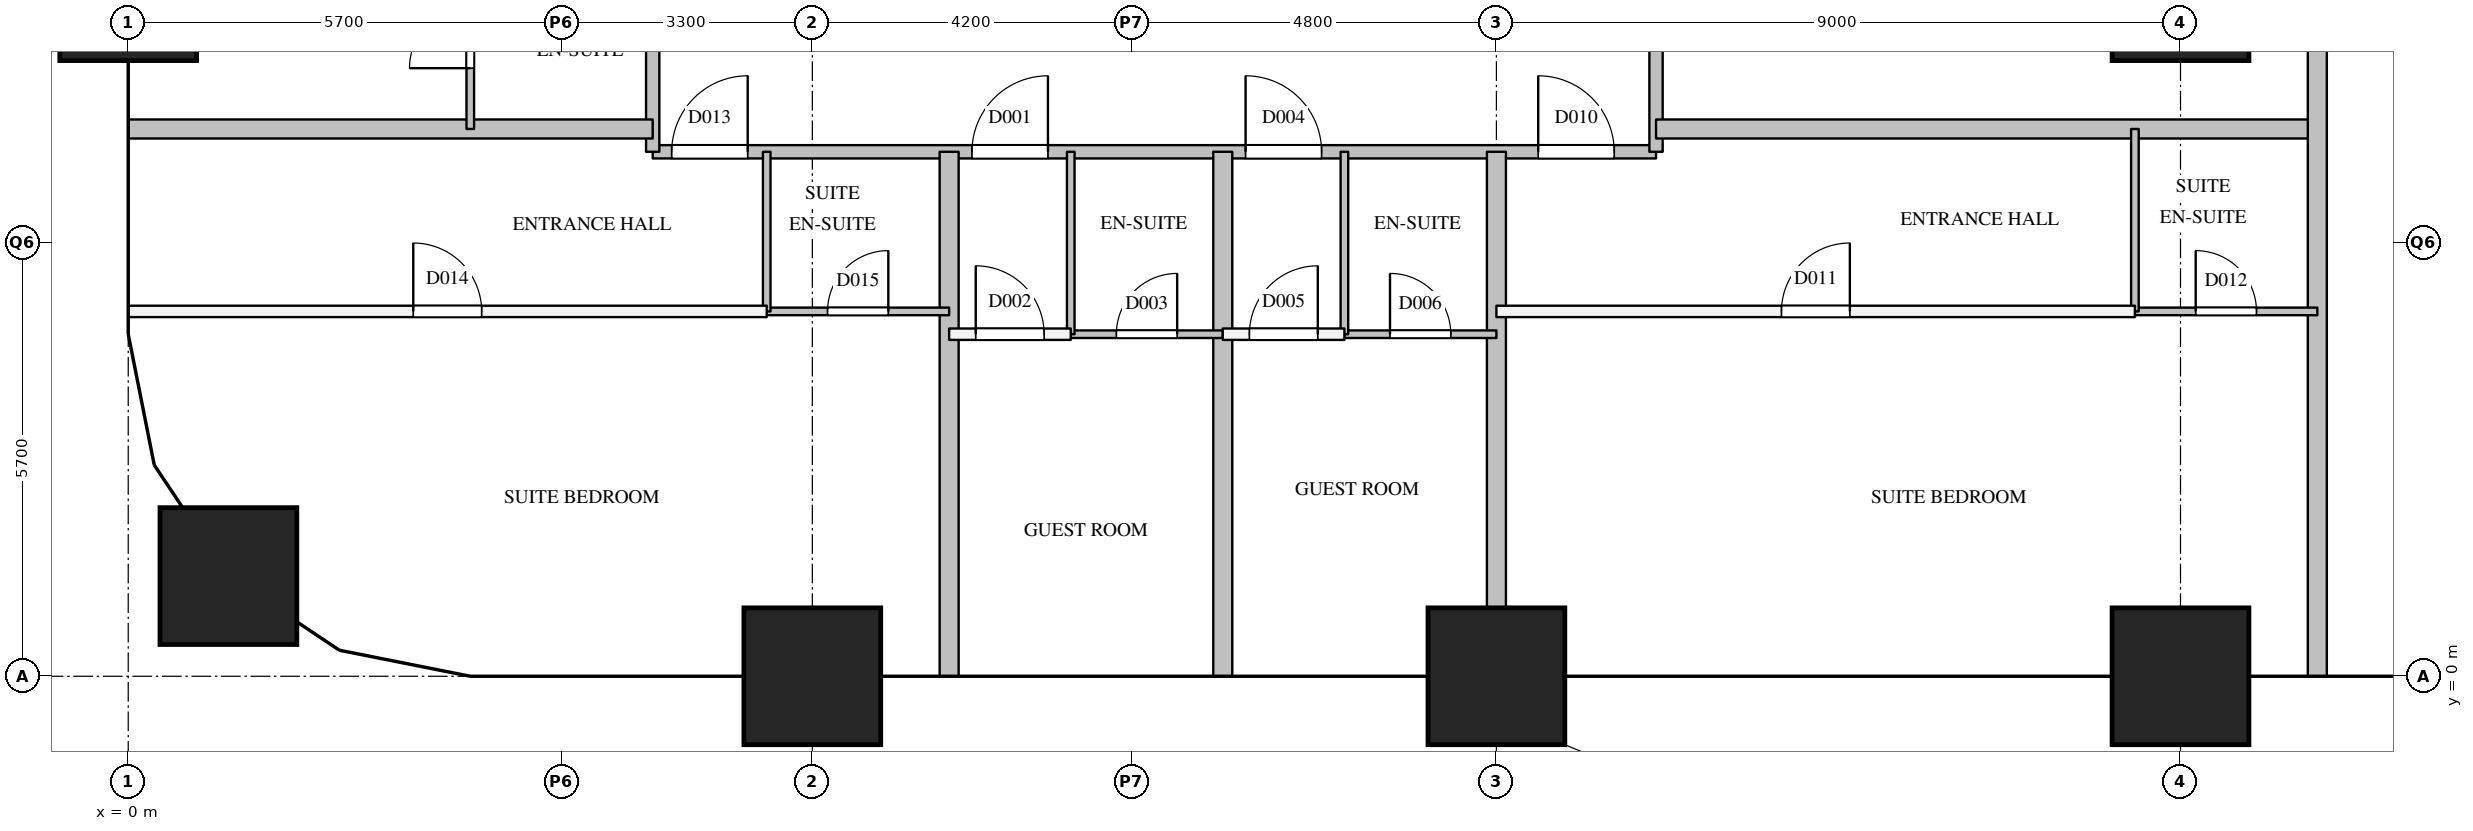
"""IFC4 building model, lengths in metres.
Left out: names, types, materials, properties, quantities, classifications, styles, units other than length and angle.
Written with IfcOpenShell. Run it as: python <this file> out.ifc"""

import sys

from ifc_helpers import new_model, si_unit, direction, frame, frame_2d, origin, origin_2d, place, context, subcontext, project, spatial, rectangle, extrude, element, fill, save


model = new_model("IFC4")
c1 = context("Model", 3, precision=1e-05, world=origin(), true_north=direction((0.0, 1.0)))
c2 = subcontext(c1, "Body", "Model", "MODEL_VIEW")
j1 = project(units=[si_unit("LENGTHUNIT", "METRE"), si_unit("PLANEANGLEUNIT", "RADIAN")], contexts=[c1])
p1 = place(None, origin())
s1 = spatial("IfcSite", under=j1, at=p1, CompositionType="ELEMENT")
p2 = place(p1, origin())
s2 = spatial("IfcBuilding", under=s1, at=p2, CompositionType="ELEMENT")
p3 = place(p2, frame((0.0, 0.0, 69.0)))
s3 = spatial("IfcBuildingStorey", under=s2, at=p3, CompositionType="ELEMENT", Elevation=69.0)
for number, where, z_axis, x_axis in (
    (1, (1.318, 1.318, 0.0), (0.0, 0.0, 1.0), (1.0, 0.0, 0.0)),
    (2, (0.0, 9.0, 0.0), (0.0, 0.0, 1.0), (1.0, 0.0, 0.0)),
    (3, (9.0, 0.0, 0.0), (0.0, 0.0, 1.0), (1.0, 0.0, 0.0)),
    (4, (18.0, 0.0, 0.0), (0.0, 0.0, 1.0), (1.0, 0.0, 0.0)),
    (5, (27.0, 0.0, 0.0), (0.0, 0.0, 1.0), (1.0, 0.0, 0.0)),
    (6, (27.0, 9.0, 0.0), (0.0, 0.0, 1.0), (1.0, 0.0, 0.0)),
):
    element("IfcColumn", number, at=place(p3, frame(where, z_axis=z_axis, x_axis=x_axis)), inside=s3, PredefinedType="COLUMN", context=c2, shape_type="SweptSolid", body=[
        extrude(rectangle(XDim=1.8, YDim=1.8, at=origin_2d()), origin(), (0.0, 0.0, 1.0), 3.8),
    ])
p4 = place(p3, frame((6.9, 6.9, 0.0), z_axis=(0.0, 0.0, 1.0), x_axis=(1.0, 0.0, 0.0)))
e7 = element("IfcWall", 7, at=p4, inside=s3, PredefinedType="PARTITIONING", context=c2, shape_type="SweptSolid", body=[
    extrude(rectangle(XDim=13.2, YDim=0.175, at=frame_2d((6.6, 0.0))), origin(), (0.0, 0.0, 1.0), 3.5),
])
p5 = place(p4, frame((4.2, 0.0, 0.0)))
e8 = element("IfcOpeningElement", 8, at=p5, cuts=e7, PredefinedType="OPENING", context=c2, shape_type="SweptSolid", body=[
    extrude(rectangle(XDim=1.0, YDim=2.1, at=frame_2d((0.5, 1.05))), frame((0.0, 0.097, 0.0), z_axis=(0.0, -1.0, 0.0), x_axis=(1.0, 0.0, 0.0)), (0.0, 0.0, 1.0), 0.195),
])
p6 = place(p4, frame((7.8, 0.0, 0.0)))
e9 = element("IfcOpeningElement", 9, at=p6, cuts=e7, PredefinedType="OPENING", context=c2, shape_type="SweptSolid", body=[
    extrude(rectangle(XDim=1.0, YDim=2.1, at=frame_2d((0.5, 1.05))), frame((0.0, 0.097, 0.0), z_axis=(0.0, -1.0, 0.0), x_axis=(1.0, 0.0, 0.0)), (0.0, 0.0, 1.0), 0.195),
])
p7 = place(p4, frame((11.65, 0.0, 0.0)))
e10 = element("IfcOpeningElement", 10, at=p7, cuts=e7, PredefinedType="OPENING", context=c2, shape_type="SweptSolid", body=[
    extrude(rectangle(XDim=1.0, YDim=2.1, at=frame_2d((0.5, 1.05))), frame((0.0, 0.097, 0.0), z_axis=(0.0, -1.0, 0.0), x_axis=(1.0, 0.0, 0.0)), (0.0, 0.0, 1.0), 0.195),
])
p8 = place(p4, frame((0.25, 0.0, 0.0)))
e11 = element("IfcOpeningElement", 11, at=p8, cuts=e7, PredefinedType="OPENING", context=c2, shape_type="SweptSolid", body=[
    extrude(rectangle(XDim=1.0, YDim=2.1, at=frame_2d((0.5, 1.05))), frame((0.0, 0.097, 0.0), z_axis=(0.0, -1.0, 0.0), x_axis=(1.0, 0.0, 0.0)), (0.0, 0.0, 1.0), 0.195),
])
p9 = place(p3, frame((6.9, 6.9, 0.0), z_axis=(0.0, 0.0, 1.0), x_axis=(0.0, 1.0, 0.0)))
e12 = element("IfcWall", 12, at=p9, inside=s3, PredefinedType="PARTITIONING", context=c2, shape_type="SweptSolid", body=[
    extrude(rectangle(XDim=17.09, YDim=0.175, at=frame_2d((8.545, 0.0))), origin(), (0.0, 0.0, 1.0), 3.5),
])
p10 = place(p9, frame((6.4, 0.0, 0.0)))
e13 = element("IfcOpeningElement", 13, at=p10, cuts=e12, PredefinedType="OPENING", context=c2, shape_type="SweptSolid", body=[
    extrude(rectangle(XDim=1.0, YDim=2.1, at=frame_2d((0.5, 1.05))), frame((0.0, 0.097, 0.0), z_axis=(0.0, -1.0, 0.0), x_axis=(1.0, 0.0, 0.0)), (0.0, 0.0, 1.0), 0.195),
])
p11 = place(p9, frame((14.795, 0.0, 0.0)))
e14 = element("IfcOpeningElement", 14, at=p11, cuts=e12, PredefinedType="OPENING", context=c2, shape_type="SweptSolid", body=[
    extrude(rectangle(XDim=1.0, YDim=2.1, at=frame_2d((0.5, 1.05))), frame((0.0, 0.097, 0.0), z_axis=(0.0, -1.0, 0.0), x_axis=(1.0, 0.0, 0.0)), (0.0, 0.0, 1.0), 0.195),
])
p12 = place(p3, frame((20.1, 6.9, 0.0), z_axis=(0.0, 0.0, 1.0), x_axis=(0.0, 1.0, 0.0)))
e15 = element("IfcWall", 15, at=p12, inside=s3, PredefinedType="PARTITIONING", context=c2, shape_type="SweptSolid", body=[
    extrude(rectangle(XDim=17.69, YDim=0.175, at=frame_2d((8.845, 0.0))), origin(), (0.0, 0.0, 1.0), 3.5),
])
p13 = place(p12, frame((1.6, 0.0, 0.0)))
e16 = element("IfcOpeningElement", 16, at=p13, cuts=e15, PredefinedType="OPENING", context=c2, shape_type="SweptSolid", body=[
    extrude(rectangle(XDim=1.0, YDim=2.1, at=frame_2d((0.5, 1.05))), frame((0.0, 0.097, 0.0), z_axis=(0.0, -1.0, 0.0), x_axis=(1.0, 0.0, 0.0)), (0.0, 0.0, 1.0), 0.195),
])
p14 = place(p12, frame((5.2, 0.0, 0.0)))
e17 = element("IfcOpeningElement", 17, at=p14, cuts=e15, PredefinedType="OPENING", context=c2, shape_type="SweptSolid", body=[
    extrude(rectangle(XDim=1.0, YDim=2.1, at=frame_2d((0.5, 1.05))), frame((0.0, 0.097, 0.0), z_axis=(0.0, -1.0, 0.0), x_axis=(1.0, 0.0, 0.0)), (0.0, 0.0, 1.0), 0.195),
])
p15 = place(p12, frame((13.895, 0.0, 0.0)))
e18 = element("IfcOpeningElement", 18, at=p15, cuts=e15, PredefinedType="OPENING", context=c2, shape_type="SweptSolid", body=[
    extrude(rectangle(XDim=1.0, YDim=2.1, at=frame_2d((0.5, 1.05))), frame((0.0, 0.097, 0.0), z_axis=(0.0, -1.0, 0.0), x_axis=(1.0, 0.0, 0.0)), (0.0, 0.0, 1.0), 0.195),
])
p16 = place(p3, frame((10.8, 4.5, 0.0), z_axis=(0.0, 0.0, 1.0), x_axis=(1.0, 0.0, 0.0)))
e19 = element("IfcWall", 19, at=p16, inside=s3, PredefinedType="PARTITIONING", context=c2, shape_type="SweptSolid", body=[
    extrude(rectangle(XDim=1.6, YDim=0.15, at=frame_2d((0.8, 0.0))), origin(), (0.0, 0.0, 1.0), 3.5),
])
p17 = place(p16, frame((0.35, 0.0, 0.0)))
e20 = element("IfcOpeningElement", 20, at=p17, cuts=e19, PredefinedType="OPENING", context=c2, shape_type="SweptSolid", body=[
    extrude(rectangle(XDim=0.9, YDim=2.1, at=frame_2d((0.45, 1.05))), frame((0.0, 0.085, 0.0), z_axis=(0.0, -1.0, 0.0), x_axis=(1.0, 0.0, 0.0)), (0.0, 0.0, 1.0), 0.17),
])
p18 = place(p3, frame((14.4, 4.5, 0.0), z_axis=(0.0, 0.0, 1.0), x_axis=(1.0, 0.0, 0.0)))
e21 = element("IfcWall", 21, at=p18, inside=s3, PredefinedType="PARTITIONING", context=c2, shape_type="SweptSolid", body=[
    extrude(rectangle(XDim=1.6, YDim=0.15, at=frame_2d((0.8, 0.0))), origin(), (0.0, 0.0, 1.0), 3.5),
])
p19 = place(p18, frame((0.35, 0.0, 0.0)))
e22 = element("IfcOpeningElement", 22, at=p19, cuts=e21, PredefinedType="OPENING", context=c2, shape_type="SweptSolid", body=[
    extrude(rectangle(XDim=0.9, YDim=2.1, at=frame_2d((0.45, 1.05))), frame((0.0, 0.085, 0.0), z_axis=(0.0, -1.0, 0.0), x_axis=(1.0, 0.0, 0.0)), (0.0, 0.0, 1.0), 0.17),
])
p20 = place(p3, frame((0.0, 4.8, 0.0), z_axis=(0.0, 0.0, 1.0), x_axis=(1.0, 0.0, 0.0)))
e23 = element("IfcWall", 23, at=p20, inside=s3, PredefinedType="PARTITIONING", context=c2, shape_type="SweptSolid", body=[
    extrude(rectangle(XDim=8.4, YDim=0.15, at=frame_2d((4.2, 0.0))), origin(), (0.0, 0.0, 1.0), 2.5),
])
p21 = place(p20, frame((3.75, 0.0, 0.0)))
e24 = element("IfcOpeningElement", 24, at=p21, cuts=e23, PredefinedType="OPENING", context=c2, shape_type="SweptSolid", body=[
    extrude(rectangle(XDim=0.9, YDim=2.1, at=frame_2d((0.45, 1.05))), frame((0.0, 0.085, 0.0), z_axis=(0.0, -1.0, 0.0), x_axis=(1.0, 0.0, 0.0)), (0.0, 0.0, 1.0), 0.17),
])
p22 = place(p3, frame((18.0, 4.8, 0.0), z_axis=(0.0, 0.0, 1.0), x_axis=(1.0, 0.0, 0.0)))
e25 = element("IfcWall", 25, at=p22, inside=s3, PredefinedType="PARTITIONING", context=c2, shape_type="SweptSolid", body=[
    extrude(rectangle(XDim=8.4, YDim=0.15, at=frame_2d((4.2, 0.0))), origin(), (0.0, 0.0, 1.0), 3.5),
])
p23 = place(p22, frame((3.75, 0.0, 0.0)))
e26 = element("IfcOpeningElement", 26, at=p23, cuts=e25, PredefinedType="OPENING", context=c2, shape_type="SweptSolid", body=[
    extrude(rectangle(XDim=0.9, YDim=2.1, at=frame_2d((0.45, 1.05))), frame((0.0, 0.085, 0.0), z_axis=(0.0, -1.0, 0.0), x_axis=(1.0, 0.0, 0.0)), (0.0, 0.0, 1.0), 0.17),
])
p24 = place(p3, frame((0.0, 7.2, 0.0), z_axis=(0.0, 0.0, 1.0), x_axis=(1.0, 0.0, 0.0)))
e27 = element("IfcWall", 27, at=p24, inside=s3, PredefinedType="PARTITIONING", context=c2, shape_type="SweptSolid", body=[
    extrude(rectangle(XDim=6.9, YDim=0.25, at=frame_2d((3.45, 0.0))), origin(), (0.0, 0.0, 1.0), 2.5),
])
p25 = place(p3, frame((20.1, 7.2, 0.0), z_axis=(0.0, 0.0, 1.0), x_axis=(1.0, 0.0, 0.0)))
e28 = element("IfcWall", 28, at=p25, inside=s3, PredefinedType="PARTITIONING", context=c2, shape_type="SweptSolid", body=[
    extrude(rectangle(XDim=8.7, YDim=0.25, at=frame_2d((4.35, 0.0))), origin(), (0.0, 0.0, 1.0), 2.5),
])
for number, where, z_axis, x_axis in (
    (29, (10.8, 0.0, 0.0), (0.0, 0.0, 1.0), (0.0, 1.0, 0.0)),
    (30, (14.4, 0.0, 0.0), (0.0, 0.0, 1.0), (0.0, 1.0, 0.0)),
):
    element("IfcWall", number, at=place(p3, frame(where, z_axis=z_axis, x_axis=x_axis)), inside=s3, PredefinedType="PARTITIONING", context=c2, shape_type="SweptSolid", body=[
        extrude(rectangle(XDim=6.9, YDim=0.25, at=frame_2d((3.45, 0.0))), origin(), (0.0, 0.0, 1.0), 2.5),
    ])
p26 = place(p3, frame((18.0, 0.0, 0.0), z_axis=(0.0, 0.0, 1.0), x_axis=(0.0, 1.0, 0.0)))
e31 = element("IfcWall", 31, at=p26, inside=s3, PredefinedType="PARTITIONING", context=c2, shape_type="SweptSolid", body=[
    extrude(rectangle(XDim=6.9, YDim=0.25, at=frame_2d((3.45, 0.0))), origin(), (0.0, 0.0, 1.0), 3.5),
])
p27 = place(p3, frame((28.8, 0.0, 0.0), z_axis=(0.0, 0.0, 1.0), x_axis=(0.0, 1.0, 0.0)))
e32 = element("IfcWall", 32, at=p27, inside=s3, PredefinedType="PARTITIONING", context=c2, shape_type="SweptSolid", body=[
    extrude(rectangle(XDim=14.4, YDim=0.25, at=frame_2d((7.2, 0.0))), origin(), (0.0, 0.0, 1.0), 2.5),
])
p28 = place(p3, frame((12.4, 4.5, 0.0), z_axis=(0.0, 0.0, 1.0), x_axis=(1.0, 0.0, 0.0)))
e33 = element("IfcWall", 33, at=p28, inside=s3, PredefinedType="PARTITIONING", context=c2, shape_type="SweptSolid", body=[
    extrude(rectangle(XDim=2.0, YDim=0.1, at=frame_2d((1.0, 0.0))), origin(), (0.0, 0.0, 1.0), 3.5),
])
p29 = place(p28, frame((0.6, 0.0, 0.0)))
e34 = element("IfcOpeningElement", 34, at=p29, cuts=e33, PredefinedType="OPENING", context=c2, shape_type="SweptSolid", body=[
    extrude(rectangle(XDim=0.8, YDim=2.1, at=frame_2d((0.4, 1.05))), frame((0.0, 0.06, 0.0), z_axis=(0.0, -1.0, 0.0), x_axis=(1.0, 0.0, 0.0)), (0.0, 0.0, 1.0), 0.12),
])
p30 = place(p3, frame((16.0, 4.5, 0.0), z_axis=(0.0, 0.0, 1.0), x_axis=(1.0, 0.0, 0.0)))
e35 = element("IfcWall", 35, at=p30, inside=s3, PredefinedType="PARTITIONING", context=c2, shape_type="SweptSolid", body=[
    extrude(rectangle(XDim=2.0, YDim=0.1, at=frame_2d((1.0, 0.0))), origin(), (0.0, 0.0, 1.0), 3.5),
])
p31 = place(p30, frame((0.6, 0.0, 0.0)))
e36 = element("IfcOpeningElement", 36, at=p31, cuts=e35, PredefinedType="OPENING", context=c2, shape_type="SweptSolid", body=[
    extrude(rectangle(XDim=0.8, YDim=2.1, at=frame_2d((0.4, 1.05))), frame((0.0, 0.06, 0.0), z_axis=(0.0, -1.0, 0.0), x_axis=(1.0, 0.0, 0.0)), (0.0, 0.0, 1.0), 0.12),
])
p32 = place(p3, frame((8.4, 4.8, 0.0), z_axis=(0.0, 0.0, 1.0), x_axis=(1.0, 0.0, 0.0)))
e37 = element("IfcWall", 37, at=p32, inside=s3, PredefinedType="PARTITIONING", context=c2, shape_type="SweptSolid", body=[
    extrude(rectangle(XDim=2.4, YDim=0.1, at=frame_2d((1.2, 0.0))), origin(), (0.0, 0.0, 1.0), 3.5),
])
p33 = place(p32, frame((0.8, 0.0, 0.0)))
e38 = element("IfcOpeningElement", 38, at=p33, cuts=e37, PredefinedType="OPENING", context=c2, shape_type="SweptSolid", body=[
    extrude(rectangle(XDim=0.8, YDim=2.1, at=frame_2d((0.4, 1.05))), frame((0.0, 0.06, 0.0), z_axis=(0.0, -1.0, 0.0), x_axis=(1.0, 0.0, 0.0)), (0.0, 0.0, 1.0), 0.12),
])
p34 = place(p3, frame((26.4, 4.8, 0.0), z_axis=(0.0, 0.0, 1.0), x_axis=(1.0, 0.0, 0.0)))
e39 = element("IfcWall", 39, at=p34, inside=s3, PredefinedType="PARTITIONING", context=c2, shape_type="SweptSolid", body=[
    extrude(rectangle(XDim=2.4, YDim=0.1, at=frame_2d((1.2, 0.0))), origin(), (0.0, 0.0, 1.0), 2.5),
])
p35 = place(p34, frame((0.8, 0.0, 0.0)))
e40 = element("IfcOpeningElement", 40, at=p35, cuts=e39, PredefinedType="OPENING", context=c2, shape_type="SweptSolid", body=[
    extrude(rectangle(XDim=0.8, YDim=2.1, at=frame_2d((0.4, 1.05))), frame((0.0, 0.06, 0.0), z_axis=(0.0, -1.0, 0.0), x_axis=(1.0, 0.0, 0.0)), (0.0, 0.0, 1.0), 0.12),
])
p36 = place(p3, frame((4.5, 7.2, 0.0), z_axis=(0.0, 0.0, 1.0), x_axis=(0.0, 1.0, 0.0)))
e41 = element("IfcWall", 41, at=p36, inside=s3, PredefinedType="PARTITIONING", context=c2, shape_type="SweptSolid", body=[
    extrude(rectangle(XDim=2.4, YDim=0.1, at=frame_2d((1.2, 0.0))), origin(), (0.0, 0.0, 1.0), 3.5),
])
p37 = place(p36, frame((0.8, 0.0, 0.0)))
e42 = element("IfcOpeningElement", 42, at=p37, cuts=e41, PredefinedType="OPENING", context=c2, shape_type="SweptSolid", body=[
    extrude(rectangle(XDim=0.8, YDim=2.1, at=frame_2d((0.4, 1.05))), frame((0.0, 0.06, 0.0), z_axis=(0.0, -1.0, 0.0), x_axis=(1.0, 0.0, 0.0)), (0.0, 0.0, 1.0), 0.12),
])
p38 = place(p3, frame((8.4, 4.8, 0.0), z_axis=(0.0, 0.0, 1.0), x_axis=(0.0, 1.0, 0.0)))
e43 = element("IfcWall", 43, at=p38, inside=s3, PredefinedType="PARTITIONING", context=c2, shape_type="SweptSolid", body=[
    extrude(rectangle(XDim=2.1, YDim=0.1, at=frame_2d((1.05, 0.0))), origin(), (0.0, 0.0, 1.0), 3.5),
])
for number, where, z_axis, x_axis in (
    (44, (12.4, 4.5, 0.0), (0.0, 0.0, 1.0), (0.0, 1.0, 0.0)),
    (45, (16.0, 4.5, 0.0), (0.0, 0.0, 1.0), (0.0, 1.0, 0.0)),
    (46, (26.4, 4.8, 0.0), (0.0, 0.0, 1.0), (0.0, 1.0, 0.0)),
):
    element("IfcWall", number, at=place(p3, frame(where, z_axis=z_axis, x_axis=x_axis)), inside=s3, PredefinedType="PARTITIONING", context=c2, shape_type="SweptSolid", body=[
        extrude(rectangle(XDim=2.4, YDim=0.1, at=frame_2d((1.2, 0.0))), origin(), (0.0, 0.0, 1.0), 3.5),
    ])
p39 = place(p5, origin())
e47 = element("IfcDoor", 47, at=p39, inside=s3, OperationType="SINGLE_SWING_RIGHT", PredefinedType="DOOR", context=c2, shape_type="SweptSolid", body=[
    extrude(rectangle(XDim=1.0, YDim=2.1, at=frame_2d((0.5, 1.05))), frame((0.0, 0.025, 0.0), z_axis=(0.0, -1.0, 0.0), x_axis=(1.0, 0.0, 0.0)), (0.0, 0.0, 1.0), 0.05),
])
fill(e8, e47)
p40 = place(p17, origin())
e48 = element("IfcDoor", 48, at=p40, inside=s3, OperationType="SINGLE_SWING_LEFT", PredefinedType="DOOR", context=c2, shape_type="SweptSolid", body=[
    extrude(rectangle(XDim=0.9, YDim=2.1, at=frame_2d((0.45, 1.05))), frame((0.0, 0.025, 0.0), z_axis=(0.0, -1.0, 0.0), x_axis=(1.0, 0.0, 0.0)), (0.0, 0.0, 1.0), 0.05),
])
fill(e20, e48)
p41 = place(p29, origin())
e49 = element("IfcDoor", 49, at=p41, inside=s3, OperationType="SINGLE_SWING_RIGHT", PredefinedType="DOOR", context=c2, shape_type="SweptSolid", body=[
    extrude(rectangle(XDim=0.8, YDim=2.1, at=frame_2d((0.4, 1.05))), frame((0.0, 0.025, 0.0), z_axis=(0.0, -1.0, 0.0), x_axis=(1.0, 0.0, 0.0)), (0.0, 0.0, 1.0), 0.05),
])
fill(e34, e49)
p42 = place(p6, origin())
e50 = element("IfcDoor", 50, at=p42, inside=s3, OperationType="SINGLE_SWING_LEFT", PredefinedType="DOOR", context=c2, shape_type="SweptSolid", body=[
    extrude(rectangle(XDim=1.0, YDim=2.1, at=frame_2d((0.5, 1.05))), frame((0.0, 0.025, 0.0), z_axis=(0.0, -1.0, 0.0), x_axis=(1.0, 0.0, 0.0)), (0.0, 0.0, 1.0), 0.05),
])
fill(e9, e50)
p43 = place(p19, origin())
e51 = element("IfcDoor", 51, at=p43, inside=s3, OperationType="SINGLE_SWING_RIGHT", PredefinedType="DOOR", context=c2, shape_type="SweptSolid", body=[
    extrude(rectangle(XDim=0.9, YDim=2.1, at=frame_2d((0.45, 1.05))), frame((0.0, 0.025, 0.0), z_axis=(0.0, -1.0, 0.0), x_axis=(1.0, 0.0, 0.0)), (0.0, 0.0, 1.0), 0.05),
])
fill(e22, e51)
p44 = place(p31, origin())
e52 = element("IfcDoor", 52, at=p44, inside=s3, OperationType="SINGLE_SWING_LEFT", PredefinedType="DOOR", context=c2, shape_type="SweptSolid", body=[
    extrude(rectangle(XDim=0.8, YDim=2.1, at=frame_2d((0.4, 1.05))), frame((0.0, 0.025, 0.0), z_axis=(0.0, -1.0, 0.0), x_axis=(1.0, 0.0, 0.0)), (0.0, 0.0, 1.0), 0.05),
])
fill(e36, e52)
p45 = place(p7, origin())
e53 = element("IfcDoor", 53, at=p45, inside=s3, OperationType="SINGLE_SWING_LEFT", PredefinedType="DOOR", context=c2, shape_type="SweptSolid", body=[
    extrude(rectangle(XDim=1.0, YDim=2.1, at=frame_2d((0.5, 1.05))), frame((0.0, 0.025, 0.0), z_axis=(0.0, -1.0, 0.0), x_axis=(1.0, 0.0, 0.0)), (0.0, 0.0, 1.0), 0.05),
])
fill(e10, e53)
p46 = place(p23, origin())
e54 = element("IfcDoor", 54, at=p46, inside=s3, OperationType="SINGLE_SWING_RIGHT", PredefinedType="DOOR", context=c2, shape_type="SweptSolid", body=[
    extrude(rectangle(XDim=0.9, YDim=2.1, at=frame_2d((0.45, 1.05))), frame((0.0, 0.025, 0.0), z_axis=(0.0, -1.0, 0.0), x_axis=(1.0, 0.0, 0.0)), (0.0, 0.0, 1.0), 0.05),
])
fill(e26, e54)
p47 = place(p35, origin())
e55 = element("IfcDoor", 55, at=p47, inside=s3, OperationType="SINGLE_SWING_LEFT", PredefinedType="DOOR", context=c2, shape_type="SweptSolid", body=[
    extrude(rectangle(XDim=0.8, YDim=2.1, at=frame_2d((0.4, 1.05))), frame((0.0, 0.025, 0.0), z_axis=(0.0, -1.0, 0.0), x_axis=(1.0, 0.0, 0.0)), (0.0, 0.0, 1.0), 0.05),
])
fill(e40, e55)
p48 = place(p8, origin())
e56 = element("IfcDoor", 56, at=p48, inside=s3, OperationType="SINGLE_SWING_RIGHT", PredefinedType="DOOR", context=c2, shape_type="SweptSolid", body=[
    extrude(rectangle(XDim=1.0, YDim=2.1, at=frame_2d((0.5, 1.05))), frame((0.0, 0.025, 0.0), z_axis=(0.0, -1.0, 0.0), x_axis=(1.0, 0.0, 0.0)), (0.0, 0.0, 1.0), 0.05),
])
fill(e11, e56)
p49 = place(p21, origin())
e57 = element("IfcDoor", 57, at=p49, inside=s3, OperationType="SINGLE_SWING_LEFT", PredefinedType="DOOR", context=c2, shape_type="SweptSolid", body=[
    extrude(rectangle(XDim=0.9, YDim=2.1, at=frame_2d((0.45, 1.05))), frame((0.0, 0.025, 0.0), z_axis=(0.0, -1.0, 0.0), x_axis=(1.0, 0.0, 0.0)), (0.0, 0.0, 1.0), 0.05),
])
fill(e24, e57)
p50 = place(p33, origin())
e58 = element("IfcDoor", 58, at=p50, inside=s3, OperationType="SINGLE_SWING_RIGHT", PredefinedType="DOOR", context=c2, shape_type="SweptSolid", body=[
    extrude(rectangle(XDim=0.8, YDim=2.1, at=frame_2d((0.4, 1.05))), frame((0.0, 0.025, 0.0), z_axis=(0.0, -1.0, 0.0), x_axis=(1.0, 0.0, 0.0)), (0.0, 0.0, 1.0), 0.05),
])
fill(e38, e58)
p51 = place(p37, origin())
e59 = element("IfcDoor", 59, at=p51, inside=s3, OperationType="SINGLE_SWING_LEFT", PredefinedType="DOOR", context=c2, shape_type="SweptSolid", body=[
    extrude(rectangle(XDim=0.8, YDim=2.1, at=frame_2d((0.4, 1.05))), frame((0.0, 0.025, 0.0), z_axis=(0.0, -1.0, 0.0), x_axis=(1.0, 0.0, 0.0)), (0.0, 0.0, 1.0), 0.05),
])
fill(e42, e59)
save(model, sys.argv[1])
